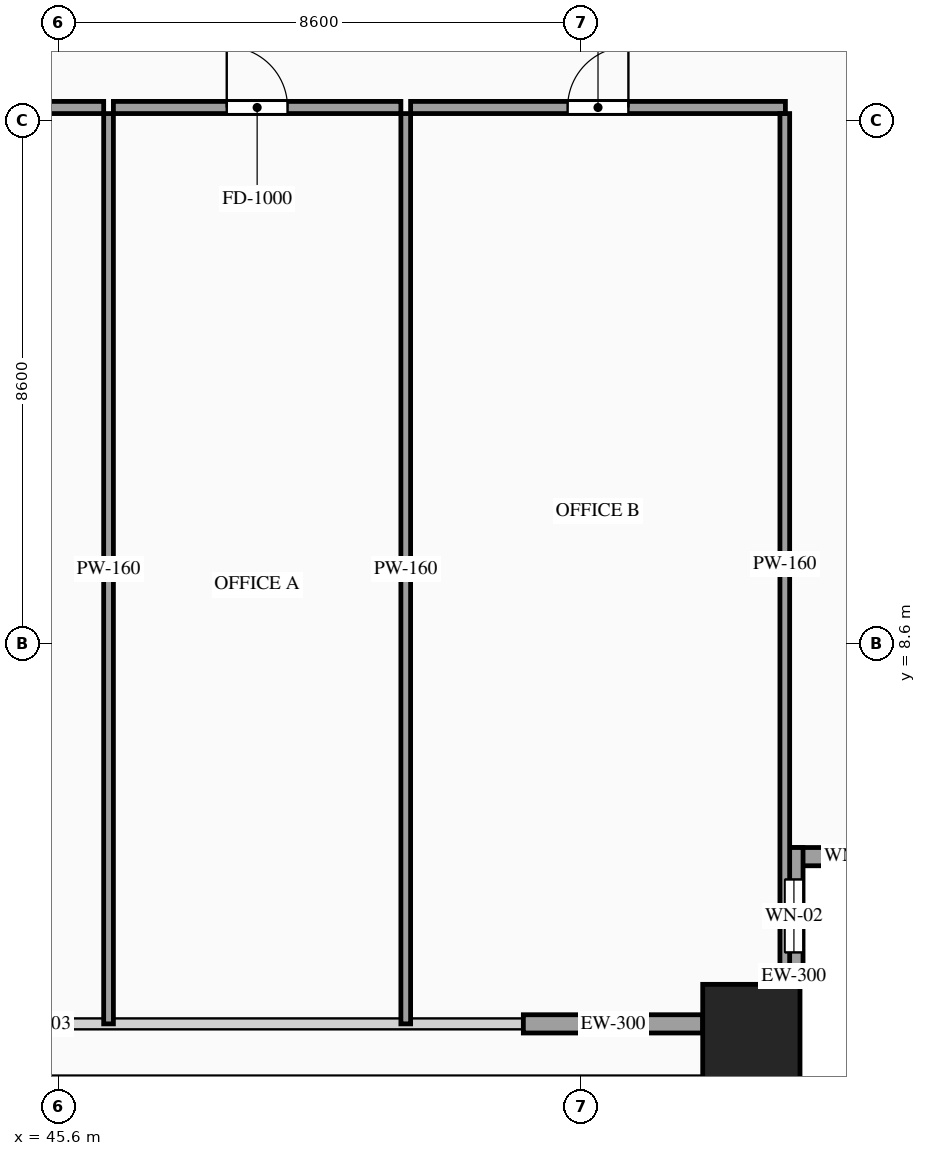
"""IFC4 building model, lengths in metres.
Left out: names, types, materials, properties, quantities, classifications, styles, units other than length and angle.
Written with IfcOpenShell. Run it as: python <this file> out.ifc"""

import sys

from ifc_helpers import new_model, si_unit, direction, frame, frame_2d, origin, origin_2d, place, context, subcontext, project, spatial, rectangle, hollow_rectangle, extrude, source, transform, mapped, element, fill, save


model = new_model("IFC4")
c1 = context("Model", 3, precision=1e-05, world=origin(), true_north=direction((0.0, 1.0)))
c2 = subcontext(c1, "Body", "Model", "MODEL_VIEW")
j1 = project(units=[si_unit("LENGTHUNIT", "METRE"), si_unit("PLANEANGLEUNIT", "RADIAN")], contexts=[c1])
p1 = place(None, origin())
s1 = spatial("IfcSite", under=j1, at=p1, CompositionType="ELEMENT")
p2 = place(p1, origin())
s2 = spatial("IfcBuilding", under=s1, at=p2, CompositionType="ELEMENT")
p3 = place(p2, frame((0.0, 0.0, 159.6)))
s3 = spatial("IfcBuildingStorey", under=s2, at=p3, CompositionType="ELEMENT", Elevation=159.6)
m1 = source(origin(), c2, "Body", "SweptSolid", [
    extrude(hollow_rectangle(XDim=1.6, YDim=1.6, WallThickness=0.07, at=origin_2d()), origin(), (0.0, 0.0, 1.0), 3.6),
])
p4 = place(p3, frame((57.0, 2.2, 0.0), z_axis=(0.0, 0.0, 1.0), x_axis=(1.0, 0.0, 0.0)))
e1 = element("IfcColumn", 1, at=p4, inside=s3, PredefinedType="COLUMN", context=c2, shape_type="MappedRepresentation", body=[
    mapped(m1, transform((0.0, 0.0, 0.0), scale=1.0)),
])
p5 = place(p3, frame((57.55, 5.1, 0.0), z_axis=(0.0, 0.0, 1.0), x_axis=(1.0, 0.0, 0.0)))
e2 = element("IfcWall", 2, at=p5, inside=s3, PredefinedType="SOLIDWALL", context=c2, shape_type="SweptSolid", body=[
    extrude(rectangle(XDim=2.25, YDim=0.3, at=frame_2d((1.125, 0.0))), origin(), (0.0, 0.0, 1.0), 3.38),
])
p6 = place(p5, frame((0.675, 0.0, 0.85)))
e3 = element("IfcOpeningElement", 3, at=p6, cuts=e2, PredefinedType="OPENING", context=c2, shape_type="SweptSolid", body=[
    extrude(rectangle(XDim=0.9, YDim=1.5, at=frame_2d((0.45, 0.75))), frame((0.0, 0.165, 0.0), z_axis=(0.0, -1.0, 0.0), x_axis=(1.0, 0.0, 0.0)), (0.0, 0.0, 1.0), 0.33),
])
p7 = place(p3, frame((57.7, 3.0, 0.0), z_axis=(0.0, 0.0, 1.0), x_axis=(0.0, 1.0, 0.0)))
e4 = element("IfcWall", 4, at=p7, inside=s3, PredefinedType="SOLIDWALL", context=c2, shape_type="SweptSolid", body=[
    extrude(rectangle(XDim=2.25, YDim=0.3, at=frame_2d((1.125, 0.0))), origin(), (0.0, 0.0, 1.0), 3.38),
])
p8 = place(p7, frame((0.525, 0.0, 0.85)))
e5 = element("IfcOpeningElement", 5, at=p8, cuts=e4, PredefinedType="OPENING", context=c2, shape_type="SweptSolid", body=[
    extrude(rectangle(XDim=1.2, YDim=2.1, at=frame_2d((0.6, 1.05))), frame((0.0, 0.165, 0.0), z_axis=(0.0, -1.0, 0.0), x_axis=(1.0, 0.0, 0.0)), (0.0, 0.0, 1.0), 0.33),
])
m2 = source(origin(), c2, "Body", "SweptSolid", [
    extrude(rectangle(XDim=2.95, YDim=0.3, at=frame_2d((1.475, 0.0))), origin(), (0.0, 0.0, 1.0), 2.775),
])
p9 = place(p3, frame((53.25, 2.35, 0.0), z_axis=(0.0, 0.0, 1.0), x_axis=(1.0, 0.0, 0.0)))
e6 = element("IfcWall", 6, at=p9, inside=s3, PredefinedType="SOLIDWALL", context=c2, shape_type="MappedRepresentation", body=[
    mapped(m2, transform((0.0, 0.0, 0.0), scale=1.0)),
])
p10 = place(p3, frame((39.647, 17.42, 0.0), z_axis=(0.0, 0.0, 1.0), x_axis=(1.0, 0.0, 0.0)))
e7 = element("IfcWall", 7, at=p10, inside=s3, PredefinedType="PARTITIONING", context=c2, shape_type="SweptSolid", body=[
    extrude(rectangle(XDim=6.701, YDim=0.2, at=frame_2d((3.351, 0.0))), origin(), (0.0, 0.0, 1.0), 3.38),
])
p11 = place(p10, frame((2.851, 0.0, 0.0)))
e8 = element("IfcOpeningElement", 8, at=p11, cuts=e7, PredefinedType="OPENING", context=c2, shape_type="SweptSolid", body=[
    extrude(rectangle(XDim=1.0, YDim=2.2, at=frame_2d((0.5, 1.1))), frame((0.0, 0.115, 0.0), z_axis=(0.0, -1.0, 0.0), x_axis=(1.0, 0.0, 0.0)), (0.0, 0.0, 1.0), 0.23),
])
m3 = source(origin(), c2, "Body", "SweptSolid", [
    extrude(rectangle(XDim=14.97, YDim=0.16, at=frame_2d((7.485, 0.0))), origin(), (0.0, 0.0, 1.0), 3.38),
])
p12 = place(p3, frame((46.428, 2.35, 0.0), z_axis=(0.0, 0.0, 1.0), x_axis=(0.0, 1.0, 0.0)))
e9 = element("IfcWall", 9, at=p12, inside=s3, PredefinedType="PARTITIONING", context=c2, shape_type="MappedRepresentation", body=[
    mapped(m3, transform((0.0, 0.0, 0.0), scale=1.0)),
])
p13 = place(p3, frame((46.508, 17.42, 0.0), z_axis=(0.0, 0.0, 1.0), x_axis=(1.0, 0.0, 0.0)))
e10 = element("IfcWall", 10, at=p13, inside=s3, PredefinedType="PARTITIONING", context=c2, shape_type="SweptSolid", body=[
    extrude(rectangle(XDim=4.728, YDim=0.2, at=frame_2d((2.364, 0.0))), origin(), (0.0, 0.0, 1.0), 3.38),
])
p14 = place(p13, frame((1.864, 0.0, 0.0)))
e11 = element("IfcOpeningElement", 11, at=p14, cuts=e10, PredefinedType="OPENING", context=c2, shape_type="SweptSolid", body=[
    extrude(rectangle(XDim=1.0, YDim=2.2, at=frame_2d((0.5, 1.1))), frame((0.0, 0.115, 0.0), z_axis=(0.0, -1.0, 0.0), x_axis=(1.0, 0.0, 0.0)), (0.0, 0.0, 1.0), 0.23),
])
p15 = place(p3, frame((51.316, 2.35, 0.0), z_axis=(0.0, 0.0, 1.0), x_axis=(0.0, 1.0, 0.0)))
e12 = element("IfcWall", 12, at=p15, inside=s3, PredefinedType="PARTITIONING", context=c2, shape_type="MappedRepresentation", body=[
    mapped(m3, transform((0.0, 0.0, 0.0), scale=1.0)),
])
p16 = place(p3, frame((51.396, 17.42, 0.0), z_axis=(0.0, 0.0, 1.0), x_axis=(1.0, 0.0, 0.0)))
e13 = element("IfcWall", 13, at=p16, inside=s3, PredefinedType="PARTITIONING", context=c2, shape_type="SweptSolid", body=[
    extrude(rectangle(XDim=6.164, YDim=0.2, at=frame_2d((3.082, 0.0))), origin(), (0.0, 0.0, 1.0), 3.38),
])
p17 = place(p16, frame((2.582, 0.0, 0.0)))
e14 = element("IfcOpeningElement", 14, at=p17, cuts=e13, PredefinedType="OPENING", context=c2, shape_type="SweptSolid", body=[
    extrude(rectangle(XDim=1.0, YDim=2.2, at=frame_2d((0.5, 1.1))), frame((0.0, 0.115, 0.0), z_axis=(0.0, -1.0, 0.0), x_axis=(1.0, 0.0, 0.0)), (0.0, 0.0, 1.0), 0.23),
])
m4 = source(origin(), c2, "Body", "SweptSolid", [
    extrude(rectangle(XDim=14.82, YDim=0.16, at=frame_2d((7.41, 0.0))), origin(), (0.0, 0.0, 1.0), 3.38),
])
p18 = place(p3, frame((57.55, 2.5, 0.0), z_axis=(0.0, 0.0, 1.0), x_axis=(0.0, 1.0, 0.0)))
e15 = element("IfcWall", 15, at=p18, inside=s3, PredefinedType="PARTITIONING", context=c2, shape_type="MappedRepresentation", body=[
    mapped(m4, transform((0.0, 0.0, 0.0), scale=1.0)),
])
m5 = source(origin(), c2, "Body", "SweptSolid", [
    extrude(rectangle(XDim=0.9, YDim=1.5, at=frame_2d((0.45, 0.75))), frame((0.0, 0.03, 0.0), z_axis=(0.0, -1.0, 0.0), x_axis=(1.0, 0.0, 0.0)), (0.0, 0.0, 1.0), 0.06),
])
p19 = place(p6, origin())
e16 = element("IfcWindow", 16, at=p19, inside=s3, PartitioningType="SINGLE_PANEL", PredefinedType="WINDOW", context=c2, shape_type="MappedRepresentation", body=[
    mapped(m5, transform((0.0, 0.0, 0.0), scale=1.0)),
])
fill(e3, e16)
m6 = source(origin(), c2, "Body", "SweptSolid", [
    extrude(rectangle(XDim=1.2, YDim=2.1, at=frame_2d((0.6, 1.05))), frame((0.0, 0.03, 0.0), z_axis=(0.0, -1.0, 0.0), x_axis=(1.0, 0.0, 0.0)), (0.0, 0.0, 1.0), 0.06),
])
p20 = place(p8, origin())
e17 = element("IfcWindow", 17, at=p20, inside=s3, PartitioningType="SINGLE_PANEL", PredefinedType="WINDOW", context=c2, shape_type="MappedRepresentation", body=[
    mapped(m6, transform((0.0, 0.0, 0.0), scale=1.0)),
])
fill(e5, e17)
m7 = source(origin(), c2, "Body", "SweptSolid", [
    extrude(rectangle(XDim=1.0, YDim=2.2, at=frame_2d((0.5, 1.1))), frame((0.0, 0.025, 0.0), z_axis=(0.0, -1.0, 0.0), x_axis=(1.0, 0.0, 0.0)), (0.0, 0.0, 1.0), 0.05),
])
p21 = place(p14, origin())
e18 = element("IfcDoor", 18, at=p21, inside=s3, OperationType="SINGLE_SWING_LEFT", PredefinedType="DOOR", context=c2, shape_type="MappedRepresentation", body=[
    mapped(m7, transform((0.0, 0.0, 0.0), scale=1.0)),
])
fill(e11, e18)
p22 = place(p17, origin())
e19 = element("IfcDoor", 19, at=p22, inside=s3, OperationType="SINGLE_SWING_RIGHT", PredefinedType="DOOR", context=c2, shape_type="MappedRepresentation", body=[
    mapped(m7, transform((0.0, 0.0, 0.0), scale=1.0)),
])
fill(e14, e19)
save(model, sys.argv[1])
